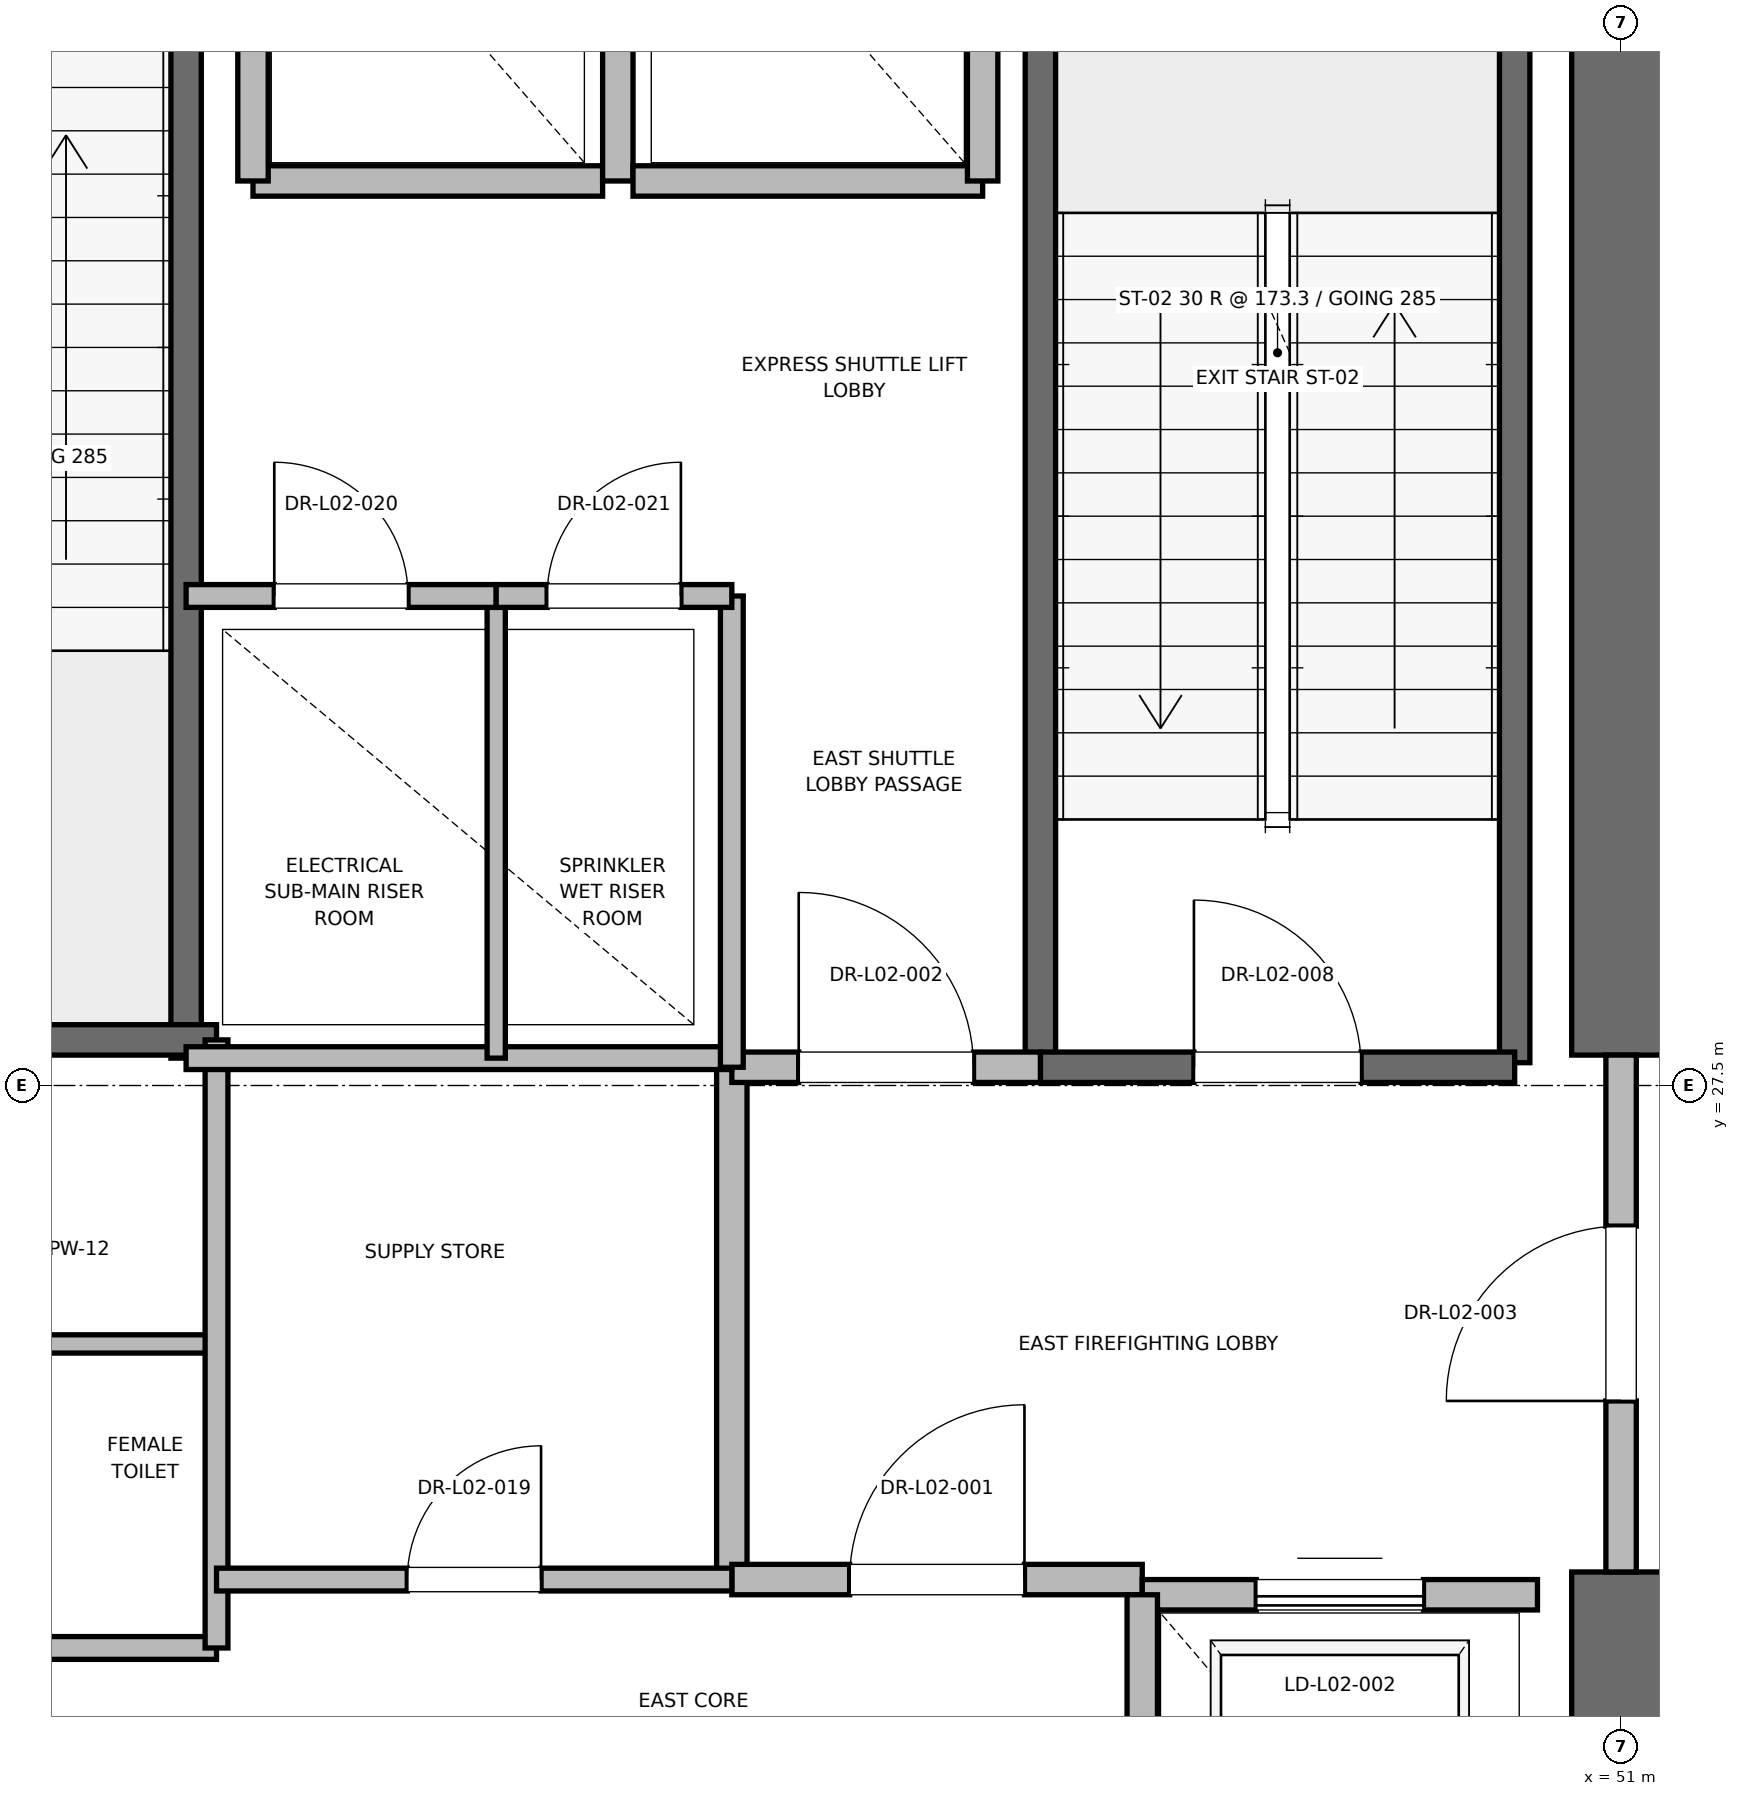
"""IFC4 building model, lengths in metres.
Left out: names, types, materials, properties, quantities, classifications, styles, units other than length and angle.
Written with IfcOpenShell. Run it as: python <this file> out.ifc"""

import sys

from ifc_helpers import new_model, si_unit, direction, frame, frame_2d, origin, place, context, subcontext, project, spatial, rectangle, extrude, element, fill, save


model = new_model("IFC4")
c1 = context("Model", 3, precision=1e-05, world=origin(), true_north=direction((0.0, 1.0)))
c2 = subcontext(c1, "Body", "Model", "MODEL_VIEW")
j1 = project(units=[si_unit("LENGTHUNIT", "METRE"), si_unit("PLANEANGLEUNIT", "RADIAN")], contexts=[c1])
p1 = place(None, origin())
s1 = spatial("IfcSite", under=j1, at=p1, CompositionType="ELEMENT")
p2 = place(p1, origin())
s2 = spatial("IfcBuilding", under=s1, at=p2, CompositionType="ELEMENT")
p3 = place(p2, frame((0.0, 0.0, 11.2)))
s3 = spatial("IfcBuildingStorey", under=s2, at=p3, CompositionType="ELEMENT", Elevation=11.2)
p4 = place(p3, frame((51.0, 18.5, 0.0), z_axis=(0.0, 0.0, 1.0), x_axis=(0.0, 1.0, 0.0)))
e1 = element("IfcWall", 1, at=p4, inside=s3, PredefinedType="SHEAR", context=c2, shape_type="SweptSolid", body=[
    extrude(rectangle(XDim=5.8, YDim=0.65, at=frame_2d((2.9, 0.0))), origin(), (0.0, 0.0, 1.0), 4.92),
])
p5 = place(p3, frame((51.0, 27.7, 0.0), z_axis=(0.0, 0.0, 1.0), x_axis=(0.0, 1.0, 0.0)))
e2 = element("IfcWall", 2, at=p5, inside=s3, PredefinedType="SHEAR", context=c2, shape_type="SweptSolid", body=[
    extrude(rectangle(XDim=8.8, YDim=0.65, at=frame_2d((4.4, 0.0))), origin(), (0.0, 0.0, 1.0), 4.92),
])
p6 = place(p3, frame((50.3, 27.65, 0.0), z_axis=(0.0, 0.0, 1.0), x_axis=(0.0, 1.0, 0.0)))
e3 = element("IfcWall", 3, at=p6, inside=s3, PredefinedType="SOLIDWALL", context=c2, shape_type="SweptSolid", body=[
    extrude(rectangle(XDim=8.15, YDim=0.2, at=frame_2d((4.075, 0.0))), origin(), (0.0, 0.0, 1.0), 4.92),
])
p7 = place(p3, frame((47.18, 27.62, 0.0), z_axis=(0.0, 0.0, 1.0), x_axis=(0.0, 1.0, 0.0)))
e4 = element("IfcWall", 4, at=p7, inside=s3, PredefinedType="SOLIDWALL", context=c2, shape_type="SweptSolid", body=[
    extrude(rectangle(XDim=8.18, YDim=0.2, at=frame_2d((4.09, 0.0))), origin(), (0.0, 0.0, 1.0), 4.92),
])
p8 = place(p3, frame((47.18, 27.62, 0.0), z_axis=(0.0, 0.0, 1.0), x_axis=(1.0, 0.0, 0.0)))
e5 = element("IfcWall", 5, at=p8, inside=s3, PredefinedType="SOLIDWALL", context=c2, shape_type="SweptSolid", body=[
    extrude(rectangle(XDim=3.12, YDim=0.2, at=frame_2d((1.56, 0.0))), origin(), (0.0, 0.0, 1.0), 4.92),
])
p9 = place(p8, frame((1.01, 0.0, 0.0)))
e6 = element("IfcOpeningElement", 6, at=p9, cuts=e5, PredefinedType="OPENING", context=c2, shape_type="SweptSolid", body=[
    extrude(rectangle(XDim=1.1, YDim=2.15, at=frame_2d((0.55, 1.075))), frame((0.0, 0.1, 0.0), z_axis=(0.0, -1.0, 0.0), x_axis=(1.0, 0.0, 0.0)), (0.0, 0.0, 1.0), 0.2),
])
p10 = place(p3, frame((41.56, 27.68, 0.0), z_axis=(0.0, 0.0, 1.0), x_axis=(0.0, 1.0, 0.0)))
e7 = element("IfcWall", 7, at=p10, inside=s3, PredefinedType="SOLIDWALL", context=c2, shape_type="SweptSolid", body=[
    extrude(rectangle(XDim=8.57, YDim=0.2, at=frame_2d((4.285, 0.0))), origin(), (0.0, 0.0, 1.0), 4.92),
])
p11 = place(p3, frame((38.44, 27.8, 0.0), z_axis=(0.0, 0.0, 1.0), x_axis=(1.0, 0.0, 0.0)))
e8 = element("IfcWall", 8, at=p11, inside=s3, PredefinedType="SOLIDWALL", context=c2, shape_type="SweptSolid", body=[
    extrude(rectangle(XDim=3.32, YDim=0.2, at=frame_2d((1.66, 0.0))), origin(), (0.0, 0.0, 1.0), 4.92),
])
p12 = place(p3, frame((45.15, 24.25, 0.0), z_axis=(0.0, 0.0, 1.0), x_axis=(0.0, 1.0, 0.0)))
e9 = element("IfcWall", 9, at=p12, inside=s3, PredefinedType="PARTITIONING", context=c2, shape_type="SweptSolid", body=[
    extrude(rectangle(XDim=3.37, YDim=0.2, at=frame_2d((1.685, 0.0))), origin(), (0.0, 0.0, 1.0), 4.92),
])
p13 = place(p3, frame((45.15, 24.25, 0.0), z_axis=(0.0, 0.0, 1.0), x_axis=(1.0, 0.0, 0.0)))
e10 = element("IfcWall", 10, at=p13, inside=s3, PredefinedType="PARTITIONING", context=c2, shape_type="SweptSolid", body=[
    extrude(rectangle(XDim=2.7, YDim=0.2, at=frame_2d((1.35, 0.0))), origin(), (0.0, 0.0, 1.0), 4.92),
])
p14 = place(p13, frame((0.775, 0.0, 0.0)))
e11 = element("IfcOpeningElement", 11, at=p14, cuts=e10, PredefinedType="OPENING", context=c2, shape_type="SweptSolid", body=[
    extrude(rectangle(XDim=1.15, YDim=2.2, at=frame_2d((0.575, 1.1))), frame((0.0, 0.1, 0.0), z_axis=(0.0, -1.0, 0.0), x_axis=(1.0, 0.0, 0.0)), (0.0, 0.0, 1.0), 0.2),
])
p15 = place(p3, frame((45.15, 27.62, 0.0), z_axis=(0.0, 0.0, 1.0), x_axis=(1.0, 0.0, 0.0)))
e12 = element("IfcWall", 12, at=p15, inside=s3, PredefinedType="PARTITIONING", context=c2, shape_type="SweptSolid", body=[
    extrude(rectangle(XDim=2.03, YDim=0.2, at=frame_2d((1.015, 0.0))), origin(), (0.0, 0.0, 1.0), 4.92),
])
p16 = place(p15, frame((0.44, 0.0, 0.0)))
e13 = element("IfcOpeningElement", 13, at=p16, cuts=e12, PredefinedType="OPENING", context=c2, shape_type="SweptSolid", body=[
    extrude(rectangle(XDim=1.15, YDim=2.2, at=frame_2d((0.575, 1.1))), frame((0.0, 0.1, 0.0), z_axis=(0.0, -1.0, 0.0), x_axis=(1.0, 0.0, 0.0)), (0.0, 0.0, 1.0), 0.2),
])
p17 = place(p3, frame((51.0, 24.3, 0.0), z_axis=(0.0, 0.0, 1.0), x_axis=(0.0, 1.0, 0.0)))
e14 = element("IfcWall", 14, at=p17, inside=s3, PredefinedType="PARTITIONING", context=c2, shape_type="SweptSolid", body=[
    extrude(rectangle(XDim=3.4, YDim=0.2, at=frame_2d((1.7, 0.0))), origin(), (0.0, 0.0, 1.0), 3.7),
])
p18 = place(p17, frame((1.125, 0.0, 0.0)))
e15 = element("IfcOpeningElement", 15, at=p18, cuts=e14, PredefinedType="OPENING", context=c2, shape_type="SweptSolid", body=[
    extrude(rectangle(XDim=1.15, YDim=2.2, at=frame_2d((0.575, 1.1))), frame((0.0, 0.1, 0.0), z_axis=(0.0, -1.0, 0.0), x_axis=(1.0, 0.0, 0.0)), (0.0, 0.0, 1.0), 0.2),
])
p19 = place(p3, frame((50.45, 24.15, 0.0), z_axis=(0.0, 0.0, 1.0), x_axis=(-1.0, 0.0, 0.0)))
e16 = element("IfcWall", 16, at=p19, inside=s3, PredefinedType="SOLIDWALL", context=c2, shape_type="SweptSolid", body=[
    extrude(rectangle(XDim=2.6, YDim=0.2, at=frame_2d((1.3, 0.0))), origin(), (0.0, 0.0, 1.0), 3.7),
])
p20 = place(p19, frame((0.75, 0.0, 0.0)))
e17 = element("IfcOpeningElement", 17, at=p20, cuts=e16, PredefinedType="OPENING", context=c2, shape_type="SweptSolid", body=[
    extrude(rectangle(XDim=1.1, YDim=2.2, at=frame_2d((0.55, 1.1))), frame((0.0, 0.1, 0.0), z_axis=(0.0, -1.0, 0.0), x_axis=(1.0, 0.0, 0.0)), (0.0, 0.0, 1.0), 0.2),
])
p21 = place(p3, frame((47.85, 24.15, 0.0), z_axis=(0.0, 0.0, 1.0), x_axis=(0.0, -1.0, 0.0)))
e18 = element("IfcWall", 18, at=p21, inside=s3, PredefinedType="SOLIDWALL", context=c2, shape_type="SweptSolid", body=[
    extrude(rectangle(XDim=3.0, YDim=0.2, at=frame_2d((1.5, 0.0))), origin(), (0.0, 0.0, 1.0), 4.92),
])
p22 = place(p3, frame((42.0, 33.45, 0.0), z_axis=(0.0, 0.0, 1.0), x_axis=(1.0, 0.0, 0.0)))
e19 = element("IfcWall", 19, at=p22, inside=s3, PredefinedType="SOLIDWALL", context=c2, shape_type="SweptSolid", body=[
    extrude(rectangle(XDim=2.3, YDim=0.2, at=frame_2d((1.15, 0.0))), origin(), (0.0, 0.0, 1.0), 4.92),
])
for number, where, z_axis, x_axis in (
    (20, (42.0, 36.05, 0.0), (0.0, 0.0, 1.0), (0.0, -1.0, 0.0)),
    (21, (44.4, 33.45, 0.0), (0.0, 0.0, 1.0), (0.0, 1.0, 0.0)),
):
    element("IfcWall", number, at=place(p3, frame(where, z_axis=z_axis, x_axis=x_axis)), inside=s3, PredefinedType="SOLIDWALL", context=c2, shape_type="SweptSolid", body=[
        extrude(rectangle(XDim=2.6, YDim=0.2, at=frame_2d((1.3, 0.0))), origin(), (0.0, 0.0, 1.0), 3.7),
    ])
p23 = place(p3, frame((44.5, 33.45, 0.0), z_axis=(0.0, 0.0, 1.0), x_axis=(1.0, 0.0, 0.0)))
e22 = element("IfcWall", 22, at=p23, inside=s3, PredefinedType="SOLIDWALL", context=c2, shape_type="SweptSolid", body=[
    extrude(rectangle(XDim=2.3, YDim=0.2, at=frame_2d((1.15, 0.0))), origin(), (0.0, 0.0, 1.0), 4.92),
])
p24 = place(p3, frame((46.8, 33.45, 0.0), z_axis=(0.0, 0.0, 1.0), x_axis=(0.0, 1.0, 0.0)))
e23 = element("IfcWall", 23, at=p24, inside=s3, PredefinedType="SOLIDWALL", context=c2, shape_type="SweptSolid", body=[
    extrude(rectangle(XDim=2.6, YDim=0.2, at=frame_2d((1.3, 0.0))), origin(), (0.0, 0.0, 1.0), 4.92),
])
p25 = place(p3, frame((39.95, 23.8, 0.0), z_axis=(0.0, 0.0, 1.0), x_axis=(1.0, 0.0, 0.0)))
e24 = element("IfcWall", 24, at=p25, inside=s3, PredefinedType="PARTITIONING", context=c2, shape_type="SweptSolid", body=[
    extrude(rectangle(XDim=1.81, YDim=0.15, at=frame_2d((0.905, 0.0))), origin(), (0.0, 0.0, 1.0), 2.85),
])
p26 = place(p3, frame((39.95, 25.8, 0.0), z_axis=(0.0, 0.0, 1.0), x_axis=(1.0, 0.0, 0.0)))
e25 = element("IfcWall", 25, at=p26, inside=s3, PredefinedType="PARTITIONING", context=c2, shape_type="SweptSolid", body=[
    extrude(rectangle(XDim=1.81, YDim=0.12, at=frame_2d((0.905, 0.0))), origin(), (0.0, 0.0, 1.0), 2.85),
])
p27 = place(p3, frame((41.76, 23.8, 0.0), z_axis=(0.0, 0.0, 1.0), x_axis=(0.0, 1.0, 0.0)))
e26 = element("IfcWall", 26, at=p27, inside=s3, PredefinedType="PARTITIONING", context=c2, shape_type="SweptSolid", body=[
    extrude(rectangle(XDim=4.0, YDim=0.15, at=frame_2d((2.0, 0.0))), origin(), (0.0, 0.0, 1.0), 2.85),
])
p28 = place(p3, frame((41.56, 27.68, 0.0), z_axis=(0.0, 0.0, 1.0), x_axis=(1.0, 0.0, 0.0)))
e27 = element("IfcWall", 27, at=p28, inside=s3, PredefinedType="PARTITIONING", context=c2, shape_type="SweptSolid", body=[
    extrude(rectangle(XDim=3.59, YDim=0.15, at=frame_2d((1.795, 0.0))), origin(), (0.0, 0.0, 1.0), 2.85),
])
p29 = place(p3, frame((41.76, 24.25, 0.0), z_axis=(0.0, 0.0, 1.0), x_axis=(1.0, 0.0, 0.0)))
e28 = element("IfcWall", 28, at=p29, inside=s3, PredefinedType="PARTITIONING", context=c2, shape_type="SweptSolid", body=[
    extrude(rectangle(XDim=3.39, YDim=0.15, at=frame_2d((1.695, 0.0))), origin(), (0.0, 0.0, 1.0), 2.85),
])
p30 = place(p29, frame((1.255, 0.0, 0.0)))
e29 = element("IfcOpeningElement", 29, at=p30, cuts=e28, PredefinedType="OPENING", context=c2, shape_type="SweptSolid", body=[
    extrude(rectangle(XDim=0.88, YDim=2.1, at=frame_2d((0.44, 1.05))), frame((0.0, 0.075, 0.0), z_axis=(0.0, -1.0, 0.0), x_axis=(1.0, 0.0, 0.0)), (0.0, 0.0, 1.0), 0.15),
])
p31 = place(p3, frame((45.15, 27.62, 0.0), z_axis=(0.0, 0.0, 1.0), x_axis=(0.0, 1.0, 0.0)))
e30 = element("IfcWall", 30, at=p31, inside=s3, PredefinedType="PARTITIONING", context=c2, shape_type="SweptSolid", body=[
    extrude(rectangle(XDim=3.1, YDim=0.15, at=frame_2d((1.55, 0.0))), origin(), (0.0, 0.0, 1.0), 2.85),
])
p32 = place(p3, frame((43.6, 27.68, 0.0), z_axis=(0.0, 0.0, 1.0), x_axis=(0.0, 1.0, 0.0)))
e31 = element("IfcWall", 31, at=p32, inside=s3, PredefinedType="PARTITIONING", context=c2, shape_type="SweptSolid", body=[
    extrude(rectangle(XDim=3.04, YDim=0.12, at=frame_2d((1.52, 0.0))), origin(), (0.0, 0.0, 1.0), 2.85),
])
p33 = place(p3, frame((41.56, 30.72, 0.0), z_axis=(0.0, 0.0, 1.0), x_axis=(1.0, 0.0, 0.0)))
e32 = element("IfcWall", 32, at=p33, inside=s3, PredefinedType="PARTITIONING", context=c2, shape_type="SweptSolid", body=[
    extrude(rectangle(XDim=2.04, YDim=0.15, at=frame_2d((1.02, 0.0))), origin(), (0.0, 0.0, 1.0), 2.85),
])
p34 = place(p33, frame((0.58, 0.0, 0.0)))
e33 = element("IfcOpeningElement", 33, at=p34, cuts=e32, PredefinedType="OPENING", context=c2, shape_type="SweptSolid", body=[
    extrude(rectangle(XDim=0.88, YDim=2.1, at=frame_2d((0.44, 1.05))), frame((0.0, 0.075, 0.0), z_axis=(0.0, -1.0, 0.0), x_axis=(1.0, 0.0, 0.0)), (0.0, 0.0, 1.0), 0.15),
])
p35 = place(p3, frame((43.6, 30.72, 0.0), z_axis=(0.0, 0.0, 1.0), x_axis=(1.0, 0.0, 0.0)))
e34 = element("IfcWall", 34, at=p35, inside=s3, PredefinedType="PARTITIONING", context=c2, shape_type="SweptSolid", body=[
    extrude(rectangle(XDim=1.55, YDim=0.15, at=frame_2d((0.775, 0.0))), origin(), (0.0, 0.0, 1.0), 2.85),
])
p36 = place(p35, frame((0.335, 0.0, 0.0)))
e35 = element("IfcOpeningElement", 35, at=p36, cuts=e34, PredefinedType="OPENING", context=c2, shape_type="SweptSolid", body=[
    extrude(rectangle(XDim=0.88, YDim=2.1, at=frame_2d((0.44, 1.05))), frame((0.0, 0.075, 0.0), z_axis=(0.0, -1.0, 0.0), x_axis=(1.0, 0.0, 0.0)), (0.0, 0.0, 1.0), 0.15),
])
p37 = place(p9, origin())
e36 = element("IfcDoor", 36, at=p37, inside=s3, OperationType="SINGLE_SWING_LEFT", PredefinedType="DOOR", context=c2, shape_type="SweptSolid", body=[
    extrude(rectangle(XDim=1.1, YDim=2.15, at=frame_2d((0.55, 1.075))), frame((0.0, 0.025, 0.0), z_axis=(0.0, -1.0, 0.0), x_axis=(1.0, 0.0, 0.0)), (0.0, 0.0, 1.0), 0.05),
])
fill(e6, e36)
p38 = place(p14, origin())
e37 = element("IfcDoor", 37, at=p38, inside=s3, OperationType="SINGLE_SWING_RIGHT", PredefinedType="DOOR", context=c2, shape_type="SweptSolid", body=[
    extrude(rectangle(XDim=1.15, YDim=2.2, at=frame_2d((0.575, 1.1))), frame((0.0, 0.025, 0.0), z_axis=(0.0, -1.0, 0.0), x_axis=(1.0, 0.0, 0.0)), (0.0, 0.0, 1.0), 0.05),
])
fill(e11, e37)
p39 = place(p16, origin())
e38 = element("IfcDoor", 38, at=p39, inside=s3, OperationType="SINGLE_SWING_LEFT", PredefinedType="DOOR", context=c2, shape_type="SweptSolid", body=[
    extrude(rectangle(XDim=1.15, YDim=2.2, at=frame_2d((0.575, 1.1))), frame((0.0, 0.025, 0.0), z_axis=(0.0, -1.0, 0.0), x_axis=(1.0, 0.0, 0.0)), (0.0, 0.0, 1.0), 0.05),
])
fill(e13, e38)
p40 = place(p18, origin())
e39 = element("IfcDoor", 39, at=p40, inside=s3, OperationType="SINGLE_SWING_LEFT", PredefinedType="DOOR", context=c2, shape_type="SweptSolid", body=[
    extrude(rectangle(XDim=1.15, YDim=2.2, at=frame_2d((0.575, 1.1))), frame((0.0, 0.025, 0.0), z_axis=(0.0, -1.0, 0.0), x_axis=(1.0, 0.0, 0.0)), (0.0, 0.0, 1.0), 0.05),
])
fill(e15, e39)
p41 = place(p20, origin())
e40 = element("IfcDoor", 40, at=p41, inside=s3, OperationType="SLIDING_TO_RIGHT", PredefinedType="DOOR", context=c2, shape_type="SweptSolid", body=[
    extrude(rectangle(XDim=1.1, YDim=2.2, at=frame_2d((0.55, 1.1))), frame((0.0, 0.025, 0.0), z_axis=(0.0, -1.0, 0.0), x_axis=(1.0, 0.0, 0.0)), (0.0, 0.0, 1.0), 0.05),
])
fill(e17, e40)
p42 = place(p30, origin())
e41 = element("IfcDoor", 41, at=p42, inside=s3, OperationType="SINGLE_SWING_RIGHT", PredefinedType="DOOR", context=c2, shape_type="SweptSolid", body=[
    extrude(rectangle(XDim=0.88, YDim=2.1, at=frame_2d((0.44, 1.05))), frame((0.0, 0.025, 0.0), z_axis=(0.0, -1.0, 0.0), x_axis=(1.0, 0.0, 0.0)), (0.0, 0.0, 1.0), 0.05),
])
fill(e29, e41)
p43 = place(p34, origin())
e42 = element("IfcDoor", 42, at=p43, inside=s3, OperationType="SINGLE_SWING_LEFT", PredefinedType="DOOR", context=c2, shape_type="SweptSolid", body=[
    extrude(rectangle(XDim=0.88, YDim=2.1, at=frame_2d((0.44, 1.05))), frame((0.0, 0.025, 0.0), z_axis=(0.0, -1.0, 0.0), x_axis=(1.0, 0.0, 0.0)), (0.0, 0.0, 1.0), 0.05),
])
fill(e33, e42)
p44 = place(p36, origin())
e43 = element("IfcDoor", 43, at=p44, inside=s3, OperationType="SINGLE_SWING_RIGHT", PredefinedType="DOOR", context=c2, shape_type="SweptSolid", body=[
    extrude(rectangle(XDim=0.88, YDim=2.1, at=frame_2d((0.44, 1.05))), frame((0.0, 0.025, 0.0), z_axis=(0.0, -1.0, 0.0), x_axis=(1.0, 0.0, 0.0)), (0.0, 0.0, 1.0), 0.05),
])
fill(e35, e43)
save(model, sys.argv[1])
